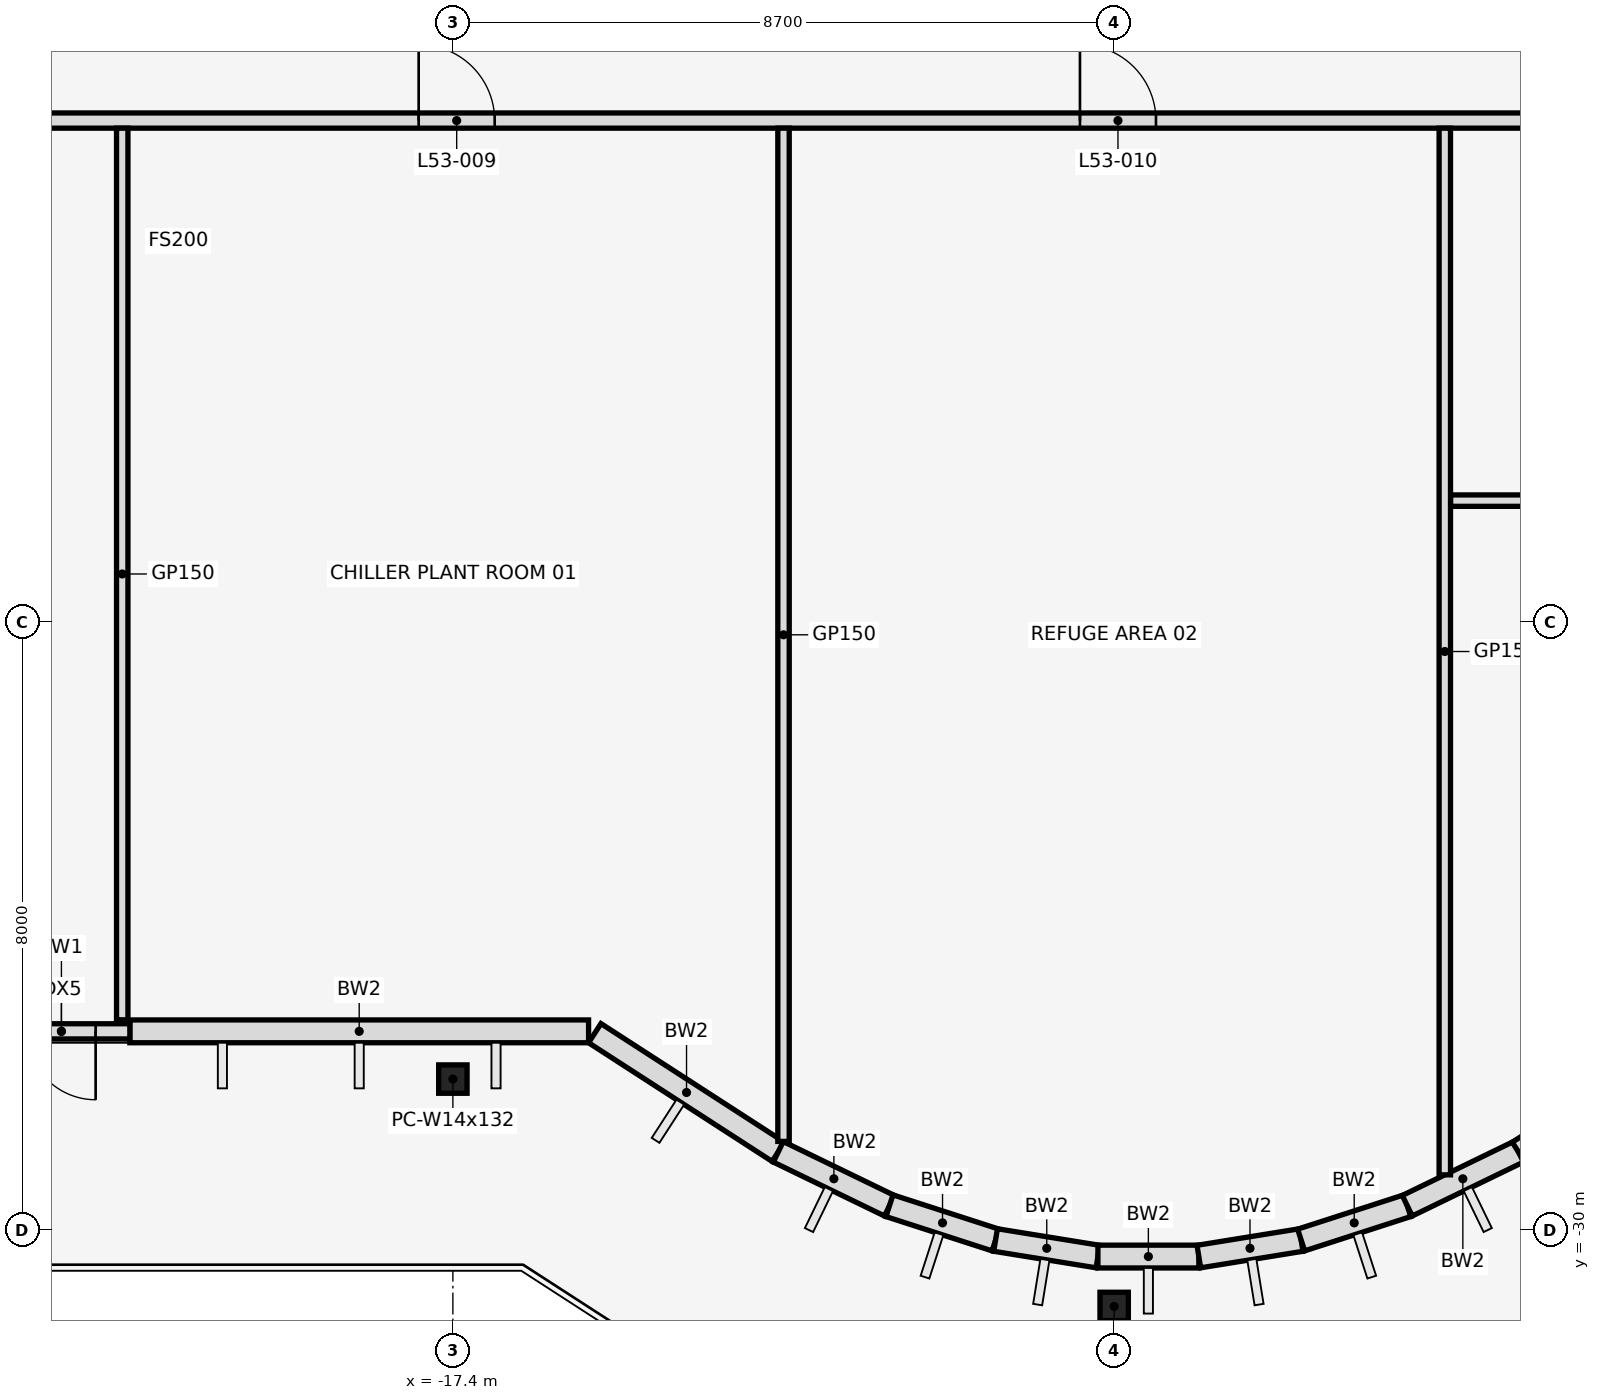
"""IFC4 building model, lengths in metres.
Left out: names, types, materials, properties, quantities, classifications, styles, units other than length and angle.
Written with IfcOpenShell. Run it as: python <this file> out.ifc"""

import sys

from ifc_helpers import new_model, si_unit, direction, frame, frame_2d, origin, origin_2d, place, context, subcontext, project, spatial, rectangle, i_section, extrude, element, fill, save


model = new_model("IFC4")
c1 = context("Model", 3, precision=1e-05, world=origin(), true_north=direction((0.0, 1.0)))
c2 = subcontext(c1, "Body", "Model", "MODEL_VIEW")
j1 = project(units=[si_unit("LENGTHUNIT", "METRE"), si_unit("PLANEANGLEUNIT", "RADIAN")], contexts=[c1])
p1 = place(None, origin())
s1 = spatial("IfcSite", under=j1, at=p1, CompositionType="ELEMENT")
p2 = place(p1, origin())
s2 = spatial("IfcBuilding", under=s1, at=p2, CompositionType="ELEMENT")
p3 = place(p2, frame((0.0, 0.0, 236.0)))
s3 = spatial("IfcBuildingStorey", under=s2, at=p3, CompositionType="ELEMENT", Elevation=236.0)
for number, where, z_axis, x_axis in (
    (1, (-17.4, -28.01, 0.0), (0.0, 0.0, 1.0), (1.0, 0.0, 0.0)),
    (2, (-8.7, -31.001, 0.0), (0.0, 0.0, 1.0), (1.0, 0.0, 0.0)),
):
    element("IfcColumn", number, at=place(p3, frame(where, z_axis=z_axis, x_axis=x_axis)), inside=s3, PredefinedType="COLUMN", context=c2, shape_type="SweptSolid", body=[
        extrude(i_section(OverallWidth=0.373, OverallDepth=0.373, WebThickness=0.016, FlangeThickness=0.026, at=origin_2d()), origin(), (0.0, 0.0, 1.0), 5.4),
    ])
p4 = place(p3, frame((-21.65, -27.382, 0.0), z_axis=(0.0, 0.0, 1.0), x_axis=(1.0, 0.0, 0.0)))
e3 = element("IfcWall", 3, at=p4, inside=s3, PredefinedType="STANDARD", context=c2, shape_type="SweptSolid", body=[
    extrude(rectangle(XDim=6.035, YDim=0.3, at=frame_2d((3.018, 0.0))), origin(), (0.0, 0.0, 1.0), 4.572),
])
p5 = place(p3, frame((-15.533, -27.406, 0.0), z_axis=(0.0, 0.0, 1.0), x_axis=(0.839779682339, -0.542927329512, 0.0)))
e4 = element("IfcWall", 4, at=p5, inside=s3, PredefinedType="STANDARD", context=c2, shape_type="SweptSolid", body=[
    extrude(rectangle(XDim=2.875, YDim=0.3, at=frame_2d((1.438, 0.0))), origin(), (0.0, 0.0, 1.0), 4.496),
])
p6 = place(p3, frame((-13.119, -28.967, 0.0), z_axis=(0.0, 0.0, 1.0), x_axis=(0.899798026589, -0.436306671214, 0.0)))
e5 = element("IfcWall", 5, at=p6, inside=s3, PredefinedType="STANDARD", context=c2, shape_type="SweptSolid", body=[
    extrude(rectangle(XDim=1.625, YDim=0.3, at=frame_2d((0.813, 0.0))), origin(), (0.0, 0.0, 1.0), 4.496),
])
p7 = place(p3, frame((-11.656, -29.676, 0.0), z_axis=(0.0, 0.0, 1.0), x_axis=(0.951539081691, -0.307527845919, 0.0)))
e6 = element("IfcWall", 6, at=p7, inside=s3, PredefinedType="STANDARD", context=c2, shape_type="SweptSolid", body=[
    extrude(rectangle(XDim=1.467, YDim=0.3, at=frame_2d((0.733, 0.0))), origin(), (0.0, 0.0, 1.0), 5.25),
])
p8 = place(p3, frame((-10.26, -30.127, 0.0), z_axis=(0.0, 0.0, 1.0), x_axis=(0.987194777017, -0.15951950423, 0.0)))
e7 = element("IfcWall", 7, at=p8, inside=s3, PredefinedType="STANDARD", context=c2, shape_type="SweptSolid", body=[
    extrude(rectangle(XDim=1.364, YDim=0.3, at=frame_2d((0.682, 0.0))), origin(), (0.0, 0.0, 1.0), 4.414),
])
p9 = place(p3, frame((-8.914, -30.345, 0.0), z_axis=(0.0, 0.0, 1.0), x_axis=(1.0, 0.0, 0.0)))
e8 = element("IfcWall", 8, at=p9, inside=s3, PredefinedType="STANDARD", context=c2, shape_type="SweptSolid", body=[
    extrude(rectangle(XDim=1.328, YDim=0.3, at=frame_2d((0.664, 0.0))), origin(), (0.0, 0.0, 1.0), 4.414),
])
p10 = place(p3, frame((-7.586, -30.345, 0.0), z_axis=(0.0, 0.0, 1.0), x_axis=(0.987194777017, 0.15951950423, 0.0)))
e9 = element("IfcWall", 9, at=p10, inside=s3, PredefinedType="STANDARD", context=c2, shape_type="SweptSolid", body=[
    extrude(rectangle(XDim=1.364, YDim=0.3, at=frame_2d((0.682, 0.0))), origin(), (0.0, 0.0, 1.0), 5.25),
])
p11 = place(p3, frame((-6.24, -30.127, 0.0), z_axis=(0.0, 0.0, 1.0), x_axis=(0.951539081691, 0.307527845919, 0.0)))
e10 = element("IfcWall", 10, at=p11, inside=s3, PredefinedType="STANDARD", context=c2, shape_type="SweptSolid", body=[
    extrude(rectangle(XDim=1.467, YDim=0.3, at=frame_2d((0.733, 0.0))), origin(), (0.0, 0.0, 1.0), 5.25),
])
p12 = place(p3, frame((-4.844, -29.676, 0.0), z_axis=(0.0, 0.0, 1.0), x_axis=(0.899798026589, 0.436306671214, 0.0)))
e11 = element("IfcWall", 11, at=p12, inside=s3, PredefinedType="STANDARD", context=c2, shape_type="SweptSolid", body=[
    extrude(rectangle(XDim=1.625, YDim=0.3, at=frame_2d((0.813, 0.0))), origin(), (0.0, 0.0, 1.0), 4.496),
])
p13 = place(p3, frame((-3.381, -28.967, 0.0), z_axis=(0.0, 0.0, 1.0), x_axis=(0.839805110115, 0.542887996759, 0.0)))
e12 = element("IfcWall", 12, at=p13, inside=s3, PredefinedType="STANDARD", context=c2, shape_type="SweptSolid", body=[
    extrude(rectangle(XDim=3.929, YDim=0.3, at=frame_2d((1.965, 0.0))), origin(), (0.0, 0.0, 1.0), 4.572),
])
p14 = place(p3, frame((-21.65, -27.382, 0.0), z_axis=(0.0, 0.0, 1.0), x_axis=(-1.0, 0.0, 0.0)))
e13 = element("IfcWall", 13, at=p14, inside=s3, PredefinedType="STANDARD", context=c2, shape_type="SweptSolid", body=[
    extrude(rectangle(XDim=1.8, YDim=0.2, at=frame_2d((0.9, 0.0))), origin(), (0.0, 0.0, 1.0), 5.25),
])
p15 = place(p14, frame((0.45, 0.0, 0.0)))
e14 = element("IfcOpeningElement", 14, at=p15, cuts=e13, PredefinedType="OPENING", context=c2, shape_type="SweptSolid", body=[
    extrude(rectangle(XDim=0.9, YDim=2.1, at=frame_2d((0.45, 1.05))), frame((0.0, 0.112, 0.0), z_axis=(0.0, -1.0, 0.0), x_axis=(1.0, 0.0, 0.0)), (0.0, 0.0, 1.0), 0.224),
])
p16 = place(p3, frame((-4.275, -20.4, 0.0), z_axis=(0.0, 0.0, 1.0), x_axis=(1.0, 0.0, 0.0)))
e15 = element("IfcWall", 15, at=p16, inside=s3, PredefinedType="PARTITIONING", context=c2, shape_type="SweptSolid", body=[
    extrude(rectangle(XDim=4.35, YDim=0.15, at=frame_2d((2.175, 0.0))), origin(), (0.0, 0.0, 1.0), 4.318),
])
p17 = place(p16, frame((1.7, 0.0, 0.0)))
e16 = element("IfcOpeningElement", 16, at=p17, cuts=e15, PredefinedType="OPENING", context=c2, shape_type="SweptSolid", body=[
    extrude(rectangle(XDim=0.9, YDim=2.1, at=frame_2d((0.45, 1.05))), frame((0.0, 0.087, 0.0), z_axis=(0.0, -1.0, 0.0), x_axis=(1.0, 0.0, 0.0)), (0.0, 0.0, 1.0), 0.174),
])
p18 = place(p3, frame((-32.7, -15.4, 0.0), z_axis=(0.0, 0.0, 1.0), x_axis=(1.0, 0.0, 0.0)))
e17 = element("IfcWall", 17, at=p18, inside=s3, PredefinedType="PARTITIONING", context=c2, shape_type="SweptSolid", body=[
    extrude(rectangle(XDim=65.4, YDim=0.2, at=frame_2d((32.7, 0.0))), origin(), (0.0, 0.0, 1.0), 4.318),
])
p19 = place(p18, frame((0.7, 0.0, 0.0)))
e18 = element("IfcOpeningElement", 18, at=p19, cuts=e17, PredefinedType="OPENING", context=c2, shape_type="SweptSolid", body=[
    extrude(rectangle(XDim=0.9, YDim=2.1, at=frame_2d((0.45, 1.05))), frame((0.0, 0.112, 0.0), z_axis=(0.0, -1.0, 0.0), x_axis=(1.0, 0.0, 0.0)), (0.0, 0.0, 1.0), 0.224),
])
p20 = place(p18, frame((4.85, 0.0, 0.0)))
e19 = element("IfcOpeningElement", 19, at=p20, cuts=e17, PredefinedType="OPENING", context=c2, shape_type="SweptSolid", body=[
    extrude(rectangle(XDim=1.0, YDim=2.1, at=frame_2d((0.5, 1.05))), frame((0.0, 0.112, 0.0), z_axis=(0.0, -1.0, 0.0), x_axis=(1.0, 0.0, 0.0)), (0.0, 0.0, 1.0), 0.224),
])
p21 = place(p18, frame((14.85, 0.0, 0.0)))
e20 = element("IfcOpeningElement", 20, at=p21, cuts=e17, PredefinedType="OPENING", context=c2, shape_type="SweptSolid", body=[
    extrude(rectangle(XDim=1.0, YDim=2.1, at=frame_2d((0.5, 1.05))), frame((0.0, 0.112, 0.0), z_axis=(0.0, -1.0, 0.0), x_axis=(1.0, 0.0, 0.0)), (0.0, 0.0, 1.0), 0.224),
])
p22 = place(p18, frame((23.55, 0.0, 0.0)))
e21 = element("IfcOpeningElement", 21, at=p22, cuts=e17, PredefinedType="OPENING", context=c2, shape_type="SweptSolid", body=[
    extrude(rectangle(XDim=1.0, YDim=2.1, at=frame_2d((0.5, 1.05))), frame((0.0, 0.112, 0.0), z_axis=(0.0, -1.0, 0.0), x_axis=(1.0, 0.0, 0.0)), (0.0, 0.0, 1.0), 0.224),
])
p23 = place(p18, frame((34.4, 0.0, 0.0)))
e22 = element("IfcOpeningElement", 22, at=p23, cuts=e17, PredefinedType="OPENING", context=c2, shape_type="SweptSolid", body=[
    extrude(rectangle(XDim=1.0, YDim=2.1, at=frame_2d((0.5, 1.05))), frame((0.0, 0.112, 0.0), z_axis=(0.0, -1.0, 0.0), x_axis=(1.0, 0.0, 0.0)), (0.0, 0.0, 1.0), 0.224),
])
p24 = place(p18, frame((40.95, 0.0, 0.0)))
e23 = element("IfcOpeningElement", 23, at=p24, cuts=e17, PredefinedType="OPENING", context=c2, shape_type="SweptSolid", body=[
    extrude(rectangle(XDim=1.0, YDim=2.1, at=frame_2d((0.5, 1.05))), frame((0.0, 0.112, 0.0), z_axis=(0.0, -1.0, 0.0), x_axis=(1.0, 0.0, 0.0)), (0.0, 0.0, 1.0), 0.224),
])
p25 = place(p18, frame((49.65, 0.0, 0.0)))
e24 = element("IfcOpeningElement", 24, at=p25, cuts=e17, PredefinedType="OPENING", context=c2, shape_type="SweptSolid", body=[
    extrude(rectangle(XDim=0.9, YDim=2.1, at=frame_2d((0.45, 1.05))), frame((0.0, 0.112, 0.0), z_axis=(0.0, -1.0, 0.0), x_axis=(1.0, 0.0, 0.0)), (0.0, 0.0, 1.0), 0.224),
])
p26 = place(p18, frame((59.55, 0.0, 0.0)))
e25 = element("IfcOpeningElement", 25, at=p26, cuts=e17, PredefinedType="OPENING", context=c2, shape_type="SweptSolid", body=[
    extrude(rectangle(XDim=1.0, YDim=2.1, at=frame_2d((0.5, 1.05))), frame((0.0, 0.112, 0.0), z_axis=(0.0, -1.0, 0.0), x_axis=(1.0, 0.0, 0.0)), (0.0, 0.0, 1.0), 0.224),
])
p27 = place(p18, frame((63.85, 0.0, 0.0)))
e26 = element("IfcOpeningElement", 26, at=p27, cuts=e17, PredefinedType="OPENING", context=c2, shape_type="SweptSolid", body=[
    extrude(rectangle(XDim=0.9, YDim=2.1, at=frame_2d((0.45, 1.05))), frame((0.0, 0.112, 0.0), z_axis=(0.0, -1.0, 0.0), x_axis=(1.0, 0.0, 0.0)), (0.0, 0.0, 1.0), 0.224),
])
p28 = place(p3, frame((-21.75, -27.23, 0.0), z_axis=(0.0, 0.0, 1.0), x_axis=(0.0, 1.0, 0.0)))
e27 = element("IfcWall", 27, at=p28, inside=s3, PredefinedType="PARTITIONING", context=c2, shape_type="SweptSolid", body=[
    extrude(rectangle(XDim=11.73, YDim=0.15, at=frame_2d((5.865, 0.0))), origin(), (0.0, 0.0, 1.0), 4.318),
])
p29 = place(p3, frame((-13.05, -28.83, 0.0), z_axis=(0.0, 0.0, 1.0), x_axis=(0.0, 1.0, 0.0)))
e28 = element("IfcWall", 28, at=p29, inside=s3, PredefinedType="PARTITIONING", context=c2, shape_type="SweptSolid", body=[
    extrude(rectangle(XDim=13.33, YDim=0.15, at=frame_2d((6.665, 0.0))), origin(), (0.0, 0.0, 1.0), 4.318),
])
p30 = place(p3, frame((-4.35, -29.27, 0.0), z_axis=(0.0, 0.0, 1.0), x_axis=(0.0, 1.0, 0.0)))
e29 = element("IfcWall", 29, at=p30, inside=s3, PredefinedType="PARTITIONING", context=c2, shape_type="SweptSolid", body=[
    extrude(rectangle(XDim=13.77, YDim=0.15, at=frame_2d((6.885, 0.0))), origin(), (0.0, 0.0, 1.0), 4.318),
])
p31 = place(p15, origin())
e30 = element("IfcDoor", 30, at=p31, inside=s3, OperationType="SINGLE_SWING_LEFT", PredefinedType="DOOR", context=c2, shape_type="SweptSolid", body=[
    extrude(rectangle(XDim=0.9, YDim=2.1, at=frame_2d((0.45, 1.05))), frame((0.0, 0.025, 0.0), z_axis=(0.0, -1.0, 0.0), x_axis=(1.0, 0.0, 0.0)), (0.0, 0.0, 1.0), 0.05),
])
fill(e14, e30)
p32 = place(p21, frame((1.0, 0.0, 0.0), z_axis=(0.0, 0.0, 1.0), x_axis=(-1.0, 0.0, 0.0)))
e31 = element("IfcDoor", 31, at=p32, inside=s3, OperationType="SINGLE_SWING_RIGHT", PredefinedType="DOOR", context=c2, shape_type="SweptSolid", body=[
    extrude(rectangle(XDim=1.0, YDim=2.1, at=frame_2d((0.5, 1.05))), frame((0.0, 0.025, 0.0), z_axis=(0.0, -1.0, 0.0), x_axis=(1.0, 0.0, 0.0)), (0.0, 0.0, 1.0), 0.05),
])
fill(e20, e31)
p33 = place(p22, frame((1.0, 0.0, 0.0), z_axis=(0.0, 0.0, 1.0), x_axis=(-1.0, 0.0, 0.0)))
e32 = element("IfcDoor", 32, at=p33, inside=s3, OperationType="SINGLE_SWING_LEFT", PredefinedType="DOOR", context=c2, shape_type="SweptSolid", body=[
    extrude(rectangle(XDim=1.0, YDim=2.1, at=frame_2d((0.5, 1.05))), frame((0.0, 0.025, 0.0), z_axis=(0.0, -1.0, 0.0), x_axis=(1.0, 0.0, 0.0)), (0.0, 0.0, 1.0), 0.05),
])
fill(e21, e32)
save(model, sys.argv[1])
